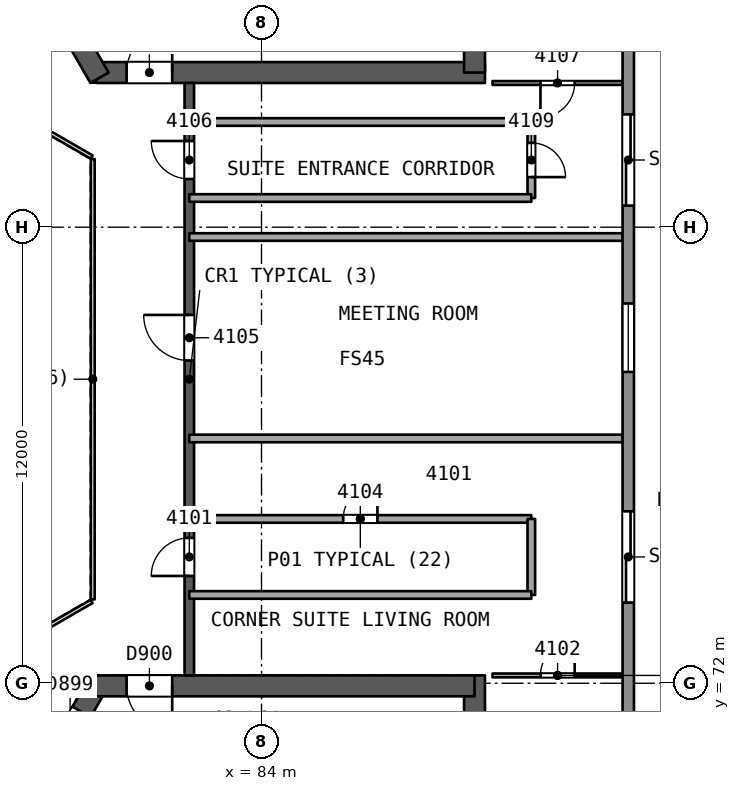
"""IFC4 building model, lengths in metres.
Left out: names, types, materials, properties, quantities, classifications, styles, units other than length and angle.
Written with IfcOpenShell. Run it as: python <this file> out.ifc"""

import sys

from ifc_helpers import new_model, si_unit, direction, frame, frame_2d, origin, place, context, subcontext, project, spatial, rectangle, extrude, element, fill, save


model = new_model("IFC4")
c1 = context("Model", 3, precision=1e-05, world=origin(), true_north=direction((0.0, 1.0)))
c2 = subcontext(c1, "Body", "Model", "MODEL_VIEW")
j1 = project(units=[si_unit("LENGTHUNIT", "METRE"), si_unit("PLANEANGLEUNIT", "RADIAN")], contexts=[c1])
p1 = place(None, origin())
s1 = spatial("IfcSite", under=j1, at=p1, CompositionType="ELEMENT")
p2 = place(p1, origin())
s2 = spatial("IfcBuilding", under=s1, at=p2, CompositionType="ELEMENT")
p3 = place(p2, frame((0.0, 0.0, 171.1)))
s3 = spatial("IfcBuildingStorey", under=s2, at=p3, CompositionType="ELEMENT", Elevation=171.1)
p4 = place(p3, frame((79.659, 88.069, 0.0), z_axis=(0.0, 0.0, 1.0), x_axis=(1.0, 0.0, 0.0)))
e1 = element("IfcWall", 1, at=p4, inside=s3, PredefinedType="SHEAR", context=c2, shape_type="SweptSolid", body=[
    extrude(rectangle(XDim=10.221, YDim=0.55, at=frame_2d((5.111, 0.0))), origin(), (0.0, 0.0, 1.0), 3.7),
])
p5 = place(p4, frame((0.791, 0.0, 0.0)))
e2 = element("IfcOpeningElement", 2, at=p5, cuts=e1, PredefinedType="OPENING", context=c2, shape_type="SweptSolid", body=[
    extrude(rectangle(XDim=1.2, YDim=2.1, at=frame_2d((0.6, 1.05))), frame((0.0, 0.286, 0.0), z_axis=(0.0, -1.0, 0.0), x_axis=(1.0, 0.0, 0.0)), (0.0, 0.0, 1.0), 0.571),
])
p6 = place(p3, frame((89.605, 88.069, 0.0), z_axis=(0.0, 0.0, 1.0), x_axis=(0.0, 1.0, 0.0)))
e3 = element("IfcWall", 3, at=p6, inside=s3, PredefinedType="SHEAR", context=c2, shape_type="SweptSolid", body=[
    extrude(rectangle(XDim=14.058, YDim=0.55, at=frame_2d((7.029, 0.0))), origin(), (0.0, 0.0, 1.0), 3.7),
])
p7 = place(p3, frame((74.686, 96.683, 0.0), z_axis=(0.0, 0.0, 1.0), x_axis=(0.499997818338, -0.866026663364, 0.0)))
e4 = element("IfcWall", 4, at=p7, inside=s3, PredefinedType="SHEAR", context=c2, shape_type="SweptSolid", body=[
    extrude(rectangle(XDim=10.105, YDim=0.55, at=frame_2d((5.052, 0.0))), origin(), (0.0, 0.0, 1.0), 3.7),
])
p8 = place(p7, frame((7.955, 0.0, 0.0)))
e5 = element("IfcOpeningElement", 5, at=p8, cuts=e4, PredefinedType="OPENING", context=c2, shape_type="SweptSolid", body=[
    extrude(rectangle(XDim=1.2, YDim=2.1, at=frame_2d((0.6, 1.05))), frame((0.0, 0.286, 0.0), z_axis=(0.0, -1.0, 0.0), x_axis=(1.0, 0.0, 0.0)), (0.0, 0.0, 1.0), 0.571),
])
p9 = place(p3, frame((79.659, 71.931, 0.0), z_axis=(0.0, 0.0, 1.0), x_axis=(-0.500000202252, -0.866025287014, 0.0)))
e6 = element("IfcWall", 6, at=p9, inside=s3, PredefinedType="SHEAR", context=c2, shape_type="SweptSolid", body=[
    extrude(rectangle(XDim=10.221, YDim=0.55, at=frame_2d((5.111, 0.0))), origin(), (0.0, 0.0, 1.0), 3.7),
])
p10 = place(p9, frame((0.791, 0.0, 0.0)))
e7 = element("IfcOpeningElement", 7, at=p10, cuts=e6, PredefinedType="OPENING", context=c2, shape_type="SweptSolid", body=[
    extrude(rectangle(XDim=1.2, YDim=2.1, at=frame_2d((0.6, 1.05))), frame((0.0, 0.286, 0.0), z_axis=(0.0, -1.0, 0.0), x_axis=(1.0, 0.0, 0.0)), (0.0, 0.0, 1.0), 0.571),
])
p11 = place(p3, frame((89.605, 58.031, 0.0), z_axis=(0.0, 0.0, 1.0), x_axis=(0.0, 1.0, 0.0)))
e8 = element("IfcWall", 8, at=p11, inside=s3, PredefinedType="SHEAR", context=c2, shape_type="SweptSolid", body=[
    extrude(rectangle(XDim=14.175, YDim=0.55, at=frame_2d((7.087, 0.0))), origin(), (0.0, 0.0, 1.0), 3.7),
])
p12 = place(p3, frame((89.605, 71.931, 0.0), z_axis=(0.0, 0.0, 1.0), x_axis=(-1.0, 0.0, 0.0)))
e9 = element("IfcWall", 9, at=p12, inside=s3, PredefinedType="SHEAR", context=c2, shape_type="SweptSolid", body=[
    extrude(rectangle(XDim=10.105, YDim=0.55, at=frame_2d((5.052, 0.0))), origin(), (0.0, 0.0, 1.0), 3.7),
])
p13 = place(p12, frame((7.955, 0.0, 0.0)))
e10 = element("IfcOpeningElement", 10, at=p13, cuts=e9, PredefinedType="OPENING", context=c2, shape_type="SweptSolid", body=[
    extrude(rectangle(XDim=1.2, YDim=2.1, at=frame_2d((0.6, 1.05))), frame((0.0, 0.286, 0.0), z_axis=(0.0, -1.0, 0.0), x_axis=(1.0, 0.0, 0.0)), (0.0, 0.0, 1.0), 0.571),
])
p14 = place(p3, frame((82.1, 72.206, 0.0), z_axis=(0.0, 0.0, 1.0), x_axis=(0.0, 1.0, 0.0)))
e11 = element("IfcWall", 11, at=p14, inside=s3, PredefinedType="SHEAR", context=c2, shape_type="SweptSolid", body=[
    extrude(rectangle(XDim=15.588, YDim=0.25, at=frame_2d((7.794, 0.0))), origin(), (0.0, 0.0, 1.0), 3.25),
])
p15 = place(p14, frame((2.618, 0.0, 0.0)))
e12 = element("IfcOpeningElement", 12, at=p15, cuts=e11, PredefinedType="OPENING", context=c2, shape_type="SweptSolid", body=[
    extrude(rectangle(XDim=1.0, YDim=2.1, at=frame_2d((0.5, 1.05))), frame((0.0, 0.135, 0.0), z_axis=(0.0, -1.0, 0.0), x_axis=(1.0, 0.0, 0.0)), (0.0, 0.0, 1.0), 0.271),
])
p16 = place(p14, frame((8.285, 0.0, 0.0)))
e13 = element("IfcOpeningElement", 13, at=p16, cuts=e11, PredefinedType="OPENING", context=c2, shape_type="SweptSolid", body=[
    extrude(rectangle(XDim=1.2, YDim=2.4, at=frame_2d((0.6, 1.2))), frame((0.0, 0.135, 0.0), z_axis=(0.0, -1.0, 0.0), x_axis=(1.0, 0.0, 0.0)), (0.0, 0.0, 1.0), 0.271),
])
p17 = place(p14, frame((13.062, 0.0, 0.0)))
e14 = element("IfcOpeningElement", 14, at=p17, cuts=e11, PredefinedType="OPENING", context=c2, shape_type="SweptSolid", body=[
    extrude(rectangle(XDim=1.0, YDim=2.1, at=frame_2d((0.5, 1.05))), frame((0.0, 0.135, 0.0), z_axis=(0.0, -1.0, 0.0), x_axis=(1.0, 0.0, 0.0)), (0.0, 0.0, 1.0), 0.271),
])
p18 = place(p3, frame((90.079, 72.206, 0.0), z_axis=(0.0, 0.0, 1.0), x_axis=(1.0, 0.0, 0.0)))
e15 = element("IfcWall", 15, at=p18, inside=s3, PredefinedType="PARTITIONING", context=c2, shape_type="SweptSolid", body=[
    extrude(rectangle(XDim=3.423, YDim=0.1, at=frame_2d((1.712, 0.0))), origin(), (0.0, 0.0, 1.0), 3.25),
])
p19 = place(p18, frame((1.262, 0.0, 0.0)))
e16 = element("IfcOpeningElement", 16, at=p19, cuts=e15, PredefinedType="OPENING", context=c2, shape_type="SweptSolid", body=[
    extrude(rectangle(XDim=0.9, YDim=2.1, at=frame_2d((0.45, 1.05))), frame((0.0, 0.061, 0.0), z_axis=(0.0, -1.0, 0.0), x_axis=(1.0, 0.0, 0.0)), (0.0, 0.0, 1.0), 0.121),
])
p20 = place(p3, frame((82.1, 76.323, 0.0), z_axis=(0.0, 0.0, 1.0), x_axis=(1.0, 0.0, 0.0)))
e17 = element("IfcWall", 17, at=p20, inside=s3, PredefinedType="PARTITIONING", context=c2, shape_type="SweptSolid", body=[
    extrude(rectangle(XDim=9.0, YDim=0.2, at=frame_2d((4.5, 0.0))), origin(), (0.0, 0.0, 1.0), 3.25),
])
p21 = place(p20, frame((4.05, 0.0, 0.0)))
e18 = element("IfcOpeningElement", 18, at=p21, cuts=e17, PredefinedType="OPENING", context=c2, shape_type="SweptSolid", body=[
    extrude(rectangle(XDim=0.9, YDim=2.1, at=frame_2d((0.45, 1.05))), frame((0.0, 0.11, 0.0), z_axis=(0.0, -1.0, 0.0), x_axis=(1.0, 0.0, 0.0)), (0.0, 0.0, 1.0), 0.221),
])
p22 = place(p3, frame((91.1, 76.323, 0.0), z_axis=(0.0, 0.0, 1.0), x_axis=(0.0, -1.0, 0.0)))
e19 = element("IfcWall", 19, at=p22, inside=s3, PredefinedType="PARTITIONING", context=c2, shape_type="SweptSolid", body=[
    extrude(rectangle(XDim=2.0, YDim=0.2, at=frame_2d((1.0, 0.0))), origin(), (0.0, 0.0, 1.0), 3.25),
])
p23 = place(p3, frame((91.1, 74.323, 0.0), z_axis=(0.0, 0.0, 1.0), x_axis=(-1.0, 0.0, 0.0)))
e20 = element("IfcWall", 20, at=p23, inside=s3, PredefinedType="PARTITIONING", context=c2, shape_type="SweptSolid", body=[
    extrude(rectangle(XDim=9.0, YDim=0.2, at=frame_2d((4.5, 0.0))), origin(), (0.0, 0.0, 1.0), 3.25),
])
for number, where, z_axis, x_axis in (
    (21, (93.502, 78.441, 0.0), (0.0, 0.0, 1.0), (-1.0, 0.0, 0.0)),
    (22, (93.502, 83.741, 0.0), (0.0, 0.0, 1.0), (-1.0, 0.0, 0.0)),
):
    element("IfcWall", number, at=place(p3, frame(where, z_axis=z_axis, x_axis=x_axis)), inside=s3, PredefinedType="PARTITIONING", context=c2, shape_type="SweptSolid", body=[
        extrude(rectangle(XDim=11.402, YDim=0.2, at=frame_2d((5.701, 0.0))), origin(), (0.0, 0.0, 1.0), 3.25),
    ])
p24 = place(p3, frame((93.502, 87.794, 0.0), z_axis=(0.0, 0.0, 1.0), x_axis=(-1.0, 0.0, 0.0)))
e23 = element("IfcWall", 23, at=p24, inside=s3, PredefinedType="PARTITIONING", context=c2, shape_type="SweptSolid", body=[
    extrude(rectangle(XDim=3.423, YDim=0.1, at=frame_2d((1.712, 0.0))), origin(), (0.0, 0.0, 1.0), 3.25),
])
p25 = place(p24, frame((1.262, 0.0, 0.0)))
e24 = element("IfcOpeningElement", 24, at=p25, cuts=e23, PredefinedType="OPENING", context=c2, shape_type="SweptSolid", body=[
    extrude(rectangle(XDim=0.9, YDim=2.1, at=frame_2d((0.45, 1.05))), frame((0.0, 0.061, 0.0), z_axis=(0.0, -1.0, 0.0), x_axis=(1.0, 0.0, 0.0)), (0.0, 0.0, 1.0), 0.121),
])
p26 = place(p3, frame((82.1, 86.768, 0.0), z_axis=(0.0, 0.0, 1.0), x_axis=(1.0, 0.0, 0.0)))
e25 = element("IfcWall", 25, at=p26, inside=s3, PredefinedType="PARTITIONING", context=c2, shape_type="SweptSolid", body=[
    extrude(rectangle(XDim=9.0, YDim=0.2, at=frame_2d((4.5, 0.0))), origin(), (0.0, 0.0, 1.0), 3.25),
])
p27 = place(p3, frame((91.1, 86.768, 0.0), z_axis=(0.0, 0.0, 1.0), x_axis=(0.0, -1.0, 0.0)))
e26 = element("IfcWall", 26, at=p27, inside=s3, PredefinedType="PARTITIONING", context=c2, shape_type="SweptSolid", body=[
    extrude(rectangle(XDim=2.0, YDim=0.2, at=frame_2d((1.0, 0.0))), origin(), (0.0, 0.0, 1.0), 3.25),
])
p28 = place(p27, frame((0.55, 0.0, 0.0)))
e27 = element("IfcOpeningElement", 27, at=p28, cuts=e26, PredefinedType="OPENING", context=c2, shape_type="SweptSolid", body=[
    extrude(rectangle(XDim=0.9, YDim=2.1, at=frame_2d((0.45, 1.05))), frame((0.0, 0.11, 0.0), z_axis=(0.0, -1.0, 0.0), x_axis=(1.0, 0.0, 0.0)), (0.0, 0.0, 1.0), 0.221),
])
p29 = place(p3, frame((91.1, 84.768, 0.0), z_axis=(0.0, 0.0, 1.0), x_axis=(-1.0, 0.0, 0.0)))
e28 = element("IfcWall", 28, at=p29, inside=s3, PredefinedType="PARTITIONING", context=c2, shape_type="SweptSolid", body=[
    extrude(rectangle(XDim=9.0, YDim=0.2, at=frame_2d((4.5, 0.0))), origin(), (0.0, 0.0, 1.0), 3.25),
])
p30 = place(p3, frame((93.651, 106.818, 0.0), z_axis=(0.0, 0.0, 1.0), x_axis=(0.0, -1.0, 0.0)))
e29 = element("IfcWall", 29, at=p30, inside=s3, PredefinedType="SOLIDWALL", context=c2, shape_type="SweptSolid", body=[
    extrude(rectangle(XDim=53.635, YDim=0.3, at=frame_2d((26.818, 0.0))), origin(), (0.0, 0.0, 1.0), 3.25),
])
p31 = place(p30, frame((30.294, 0.0, 0.0)))
e30 = element("IfcOpeningElement", 30, at=p31, cuts=e29, PredefinedType="OPENING", context=c2, shape_type="SweptSolid", body=[
    extrude(rectangle(XDim=2.4, YDim=2.4, at=frame_2d((1.2, 1.2))), frame((0.0, 0.161, 0.0), z_axis=(0.0, -1.0, 0.0), x_axis=(1.0, 0.0, 0.0)), (0.0, 0.0, 1.0), 0.321),
])
p32 = place(p30, frame((41.683, 0.0, 0.0)))
e31 = element("IfcOpeningElement", 31, at=p32, cuts=e29, PredefinedType="OPENING", context=c2, shape_type="SweptSolid", body=[
    extrude(rectangle(XDim=2.4, YDim=2.4, at=frame_2d((1.2, 1.2))), frame((0.0, 0.161, 0.0), z_axis=(0.0, -1.0, 0.0), x_axis=(1.0, 0.0, 0.0)), (0.0, 0.0, 1.0), 0.321),
])
p33 = place(p30, frame((19.85, 0.0, 0.0)))
e32 = element("IfcOpeningElement", 32, at=p33, cuts=e29, PredefinedType="OPENING", context=c2, shape_type="SweptSolid", body=[
    extrude(rectangle(XDim=2.4, YDim=2.4, at=frame_2d((1.2, 1.2))), frame((0.0, 0.161, 0.0), z_axis=(0.0, -1.0, 0.0), x_axis=(1.0, 0.0, 0.0)), (0.0, 0.0, 1.0), 0.321),
])
p34 = place(p30, frame((9.514, 0.0, 0.0)))
e33 = element("IfcOpeningElement", 33, at=p34, cuts=e29, PredefinedType="OPENING", context=c2, shape_type="SweptSolid", body=[
    extrude(rectangle(XDim=2.4, YDim=2.4, at=frame_2d((1.2, 1.2))), frame((0.0, 0.161, 0.0), z_axis=(0.0, -1.0, 0.0), x_axis=(1.0, 0.0, 0.0)), (0.0, 0.0, 1.0), 0.321),
])
p35 = place(p30, frame((24.826, 0.0, 0.9)))
e34 = element("IfcOpeningElement", 34, at=p35, cuts=e29, PredefinedType="OPENING", context=c2, shape_type="SweptSolid", body=[
    extrude(rectangle(XDim=1.8, YDim=1.5, at=frame_2d((0.9, 0.75))), frame((0.0, 0.161, 0.0), z_axis=(0.0, -1.0, 0.0), x_axis=(1.0, 0.0, 0.0)), (0.0, 0.0, 1.0), 0.321),
])
p36 = place(p3, frame((42.45, 82.744, 0.0), z_axis=(0.0, 0.0, 1.0), x_axis=(0.866024128163, 0.500002209434, 0.0)))
e35 = element("IfcWall", 35, at=p36, inside=s3, PredefinedType="SOLIDWALL", context=c2, shape_type="SweptSolid", body=[
    extrude(rectangle(XDim=53.635, YDim=0.3, at=frame_2d((26.817, 0.0))), origin(), (0.0, 0.0, 1.0), 3.25),
])
p37 = place(p36, frame((20.473, 0.0, 0.0)))
e36 = element("IfcOpeningElement", 36, at=p37, cuts=e35, PredefinedType="OPENING", context=c2, shape_type="SweptSolid", body=[
    extrude(rectangle(XDim=2.4, YDim=2.4, at=frame_2d((1.2, 1.2))), frame((0.0, 0.161, 0.0), z_axis=(0.0, -1.0, 0.0), x_axis=(1.0, 0.0, 0.0)), (0.0, 0.0, 1.0), 0.321),
])
p38 = place(p36, frame((9.514, 0.0, 0.0)))
e37 = element("IfcOpeningElement", 37, at=p38, cuts=e35, PredefinedType="OPENING", context=c2, shape_type="SweptSolid", body=[
    extrude(rectangle(XDim=2.4, YDim=2.4, at=frame_2d((1.2, 1.2))), frame((0.0, 0.161, 0.0), z_axis=(0.0, -1.0, 0.0), x_axis=(1.0, 0.0, 0.0)), (0.0, 0.0, 1.0), 0.321),
])
p39 = place(p36, frame((40.628, 0.0, 0.0)))
e38 = element("IfcOpeningElement", 38, at=p39, cuts=e35, PredefinedType="OPENING", context=c2, shape_type="SweptSolid", body=[
    extrude(rectangle(XDim=2.4, YDim=2.4, at=frame_2d((1.2, 1.2))), frame((0.0, 0.161, 0.0), z_axis=(0.0, -1.0, 0.0), x_axis=(1.0, 0.0, 0.0)), (0.0, 0.0, 1.0), 0.321),
])
p40 = place(p36, frame((27.632, 0.0, 0.9)))
e39 = element("IfcOpeningElement", 39, at=p40, cuts=e35, PredefinedType="OPENING", context=c2, shape_type="SweptSolid", body=[
    extrude(rectangle(XDim=1.8, YDim=1.5, at=frame_2d((0.9, 0.75))), frame((0.0, 0.161, 0.0), z_axis=(0.0, -1.0, 0.0), x_axis=(1.0, 0.0, 0.0)), (0.0, 0.0, 1.0), 0.321),
])
p41 = place(p36, frame((24.826, 0.0, 0.9)))
e40 = element("IfcOpeningElement", 40, at=p41, cuts=e35, PredefinedType="OPENING", context=c2, shape_type="SweptSolid", body=[
    extrude(rectangle(XDim=1.8, YDim=1.5, at=frame_2d((0.9, 0.75))), frame((0.0, 0.161, 0.0), z_axis=(0.0, -1.0, 0.0), x_axis=(1.0, 0.0, 0.0)), (0.0, 0.0, 1.0), 0.321),
])
p42 = place(p3, frame((88.899, 50.439, 0.0), z_axis=(0.0, 0.0, 1.0), x_axis=(-0.866024128163, 0.500002209434, 0.0)))
e41 = element("IfcWall", 41, at=p42, inside=s3, PredefinedType="SOLIDWALL", context=c2, shape_type="SweptSolid", body=[
    extrude(rectangle(XDim=53.635, YDim=0.3, at=frame_2d((26.817, 0.0))), origin(), (0.0, 0.0, 1.0), 3.25),
])
p43 = place(p42, frame((30.45, 0.0, 0.0)))
e42 = element("IfcOpeningElement", 42, at=p43, cuts=e41, PredefinedType="OPENING", context=c2, shape_type="SweptSolid", body=[
    extrude(rectangle(XDim=2.4, YDim=2.4, at=frame_2d((1.2, 1.2))), frame((0.0, 0.161, 0.0), z_axis=(0.0, -1.0, 0.0), x_axis=(1.0, 0.0, 0.0)), (0.0, 0.0, 1.0), 0.321),
])
p44 = place(p42, frame((41.683, 0.0, 0.0)))
e43 = element("IfcOpeningElement", 43, at=p44, cuts=e41, PredefinedType="OPENING", context=c2, shape_type="SweptSolid", body=[
    extrude(rectangle(XDim=2.4, YDim=2.4, at=frame_2d((1.2, 1.2))), frame((0.0, 0.161, 0.0), z_axis=(0.0, -1.0, 0.0), x_axis=(1.0, 0.0, 0.0)), (0.0, 0.0, 1.0), 0.321),
])
p45 = place(p42, frame((10.295, 0.0, 0.0)))
e44 = element("IfcOpeningElement", 44, at=p45, cuts=e41, PredefinedType="OPENING", context=c2, shape_type="SweptSolid", body=[
    extrude(rectangle(XDim=2.4, YDim=2.4, at=frame_2d((1.2, 1.2))), frame((0.0, 0.161, 0.0), z_axis=(0.0, -1.0, 0.0), x_axis=(1.0, 0.0, 0.0)), (0.0, 0.0, 1.0), 0.321),
])
p46 = place(p42, frame((24.982, 0.0, 0.9)))
e45 = element("IfcOpeningElement", 45, at=p46, cuts=e41, PredefinedType="OPENING", context=c2, shape_type="SweptSolid", body=[
    extrude(rectangle(XDim=1.8, YDim=1.5, at=frame_2d((0.9, 0.75))), frame((0.0, 0.161, 0.0), z_axis=(0.0, -1.0, 0.0), x_axis=(1.0, 0.0, 0.0)), (0.0, 0.0, 1.0), 0.321),
])
p47 = place(p3, frame((79.56, 74.206, 0.0), z_axis=(0.0, 0.0, 1.0), x_axis=(0.0, 1.0, 0.0)))
e46 = element("IfcWall", 46, at=p47, inside=s3, PredefinedType="PARTITIONING", context=c2, shape_type="SweptSolid", body=[
    extrude(rectangle(XDim=11.588, YDim=0.1, at=frame_2d((5.794, 0.0))), origin(), (0.0, 0.0, 1.0), 3.25),
])
for number, where, z_axis, x_axis in (
    (47, (79.53, 85.846, 0.0), (0.0, 0.0, 1.0), (-0.866, 0.5, 0.0)),
    (48, (77.798, 73.154, 0.0), (0.0, 0.0, 1.0), (0.866, 0.5, 0.0)),
):
    element("IfcWall", number, at=place(p3, frame(where, z_axis=z_axis, x_axis=x_axis)), inside=s3, PredefinedType="PARTITIONING", context=c2, shape_type="SweptSolid", body=[
        extrude(rectangle(XDim=2.0, YDim=0.1, at=frame_2d((1.0, 0.0))), origin(), (0.0, 0.0, 1.0), 3.25),
    ])
p48 = place(p15, origin())
e49 = element("IfcDoor", 49, at=p48, inside=s3, OperationType="SINGLE_SWING_LEFT", PredefinedType="NOTDEFINED", context=c2, shape_type="SweptSolid", body=[
    extrude(rectangle(XDim=1.0, YDim=2.1, at=frame_2d((0.5, 1.05))), frame((0.0, 0.025, 0.0), z_axis=(0.0, -1.0, 0.0), x_axis=(1.0, 0.0, 0.0)), (0.0, 0.0, 1.0), 0.05),
])
fill(e12, e49)
p49 = place(p19, origin())
e50 = element("IfcDoor", 50, at=p49, inside=s3, OperationType="SINGLE_SWING_RIGHT", PredefinedType="NOTDEFINED", context=c2, shape_type="SweptSolid", body=[
    extrude(rectangle(XDim=0.9, YDim=2.1, at=frame_2d((0.45, 1.05))), frame((0.0, 0.025, 0.0), z_axis=(0.0, -1.0, 0.0), x_axis=(1.0, 0.0, 0.0)), (0.0, 0.0, 1.0), 0.05),
])
fill(e16, e50)
p50 = place(p21, origin())
e51 = element("IfcDoor", 51, at=p50, inside=s3, OperationType="SINGLE_SWING_RIGHT", PredefinedType="NOTDEFINED", context=c2, shape_type="SweptSolid", body=[
    extrude(rectangle(XDim=0.9, YDim=2.1, at=frame_2d((0.45, 1.05))), frame((0.0, 0.025, 0.0), z_axis=(0.0, -1.0, 0.0), x_axis=(1.0, 0.0, 0.0)), (0.0, 0.0, 1.0), 0.05),
])
fill(e18, e51)
p51 = place(p16, origin())
e52 = element("IfcDoor", 52, at=p51, inside=s3, OperationType="SINGLE_SWING_RIGHT", PredefinedType="NOTDEFINED", context=c2, shape_type="SweptSolid", body=[
    extrude(rectangle(XDim=1.2, YDim=2.4, at=frame_2d((0.6, 1.2))), frame((0.0, 0.025, 0.0), z_axis=(0.0, -1.0, 0.0), x_axis=(1.0, 0.0, 0.0)), (0.0, 0.0, 1.0), 0.05),
])
fill(e13, e52)
p52 = place(p17, origin())
e53 = element("IfcDoor", 53, at=p52, inside=s3, OperationType="SINGLE_SWING_RIGHT", PredefinedType="NOTDEFINED", context=c2, shape_type="SweptSolid", body=[
    extrude(rectangle(XDim=1.0, YDim=2.1, at=frame_2d((0.5, 1.05))), frame((0.0, 0.025, 0.0), z_axis=(0.0, -1.0, 0.0), x_axis=(1.0, 0.0, 0.0)), (0.0, 0.0, 1.0), 0.05),
])
fill(e14, e53)
p53 = place(p25, origin())
e54 = element("IfcDoor", 54, at=p53, inside=s3, OperationType="SINGLE_SWING_RIGHT", PredefinedType="NOTDEFINED", context=c2, shape_type="SweptSolid", body=[
    extrude(rectangle(XDim=0.9, YDim=2.1, at=frame_2d((0.45, 1.05))), frame((0.0, 0.025, 0.0), z_axis=(0.0, -1.0, 0.0), x_axis=(1.0, 0.0, 0.0)), (0.0, 0.0, 1.0), 0.05),
])
fill(e24, e54)
p54 = place(p28, origin())
e55 = element("IfcDoor", 55, at=p54, inside=s3, OperationType="SINGLE_SWING_RIGHT", PredefinedType="NOTDEFINED", context=c2, shape_type="SweptSolid", body=[
    extrude(rectangle(XDim=0.9, YDim=2.1, at=frame_2d((0.45, 1.05))), frame((0.0, 0.025, 0.0), z_axis=(0.0, -1.0, 0.0), x_axis=(1.0, 0.0, 0.0)), (0.0, 0.0, 1.0), 0.05),
])
fill(e27, e55)
p55 = place(p31, origin())
e56 = element("IfcDoor", 56, at=p55, inside=s3, OperationType="SLIDING_TO_LEFT", PredefinedType="NOTDEFINED", context=c2, shape_type="SweptSolid", body=[
    extrude(rectangle(XDim=2.4, YDim=2.4, at=frame_2d((1.2, 1.2))), frame((0.0, 0.025, 0.0), z_axis=(0.0, -1.0, 0.0), x_axis=(1.0, 0.0, 0.0)), (0.0, 0.0, 1.0), 0.05),
])
fill(e30, e56)
p56 = place(p33, origin())
e57 = element("IfcDoor", 57, at=p56, inside=s3, OperationType="SLIDING_TO_LEFT", PredefinedType="NOTDEFINED", context=c2, shape_type="SweptSolid", body=[
    extrude(rectangle(XDim=2.4, YDim=2.4, at=frame_2d((1.2, 1.2))), frame((0.0, 0.025, 0.0), z_axis=(0.0, -1.0, 0.0), x_axis=(1.0, 0.0, 0.0)), (0.0, 0.0, 1.0), 0.05),
])
fill(e32, e57)
p57 = place(p35, origin())
e58 = element("IfcWindow", 58, at=p57, inside=s3, PartitioningType="SINGLE_PANEL", PredefinedType="WINDOW", context=c2, shape_type="SweptSolid", body=[
    extrude(rectangle(XDim=1.8, YDim=1.5, at=frame_2d((0.9, 0.75))), frame((0.0, 0.03, 0.0), z_axis=(0.0, -1.0, 0.0), x_axis=(1.0, 0.0, 0.0)), (0.0, 0.0, 1.0), 0.06),
])
fill(e34, e58)
p58 = place(p5, origin())
e59 = element("IfcDoor", 59, at=p58, inside=s3, OperationType="SINGLE_SWING_RIGHT", PredefinedType="NOTDEFINED", context=c2, shape_type="SweptSolid", body=[
    extrude(rectangle(XDim=1.2, YDim=2.1, at=frame_2d((0.6, 1.05))), frame((0.0, 0.025, 0.0), z_axis=(0.0, -1.0, 0.0), x_axis=(1.0, 0.0, 0.0)), (0.0, 0.0, 1.0), 0.05),
])
fill(e2, e59)
p59 = place(p10, origin())
e60 = element("IfcDoor", 60, at=p59, inside=s3, OperationType="SINGLE_SWING_RIGHT", PredefinedType="NOTDEFINED", context=c2, shape_type="SweptSolid", body=[
    extrude(rectangle(XDim=1.2, YDim=2.1, at=frame_2d((0.6, 1.05))), frame((0.0, 0.025, 0.0), z_axis=(0.0, -1.0, 0.0), x_axis=(1.0, 0.0, 0.0)), (0.0, 0.0, 1.0), 0.05),
])
fill(e7, e60)
p60 = place(p13, origin())
e61 = element("IfcDoor", 61, at=p60, inside=s3, OperationType="SINGLE_SWING_LEFT", PredefinedType="NOTDEFINED", context=c2, shape_type="SweptSolid", body=[
    extrude(rectangle(XDim=1.2, YDim=2.1, at=frame_2d((0.6, 1.05))), frame((0.0, 0.025, 0.0), z_axis=(0.0, -1.0, 0.0), x_axis=(1.0, 0.0, 0.0)), (0.0, 0.0, 1.0), 0.05),
])
fill(e10, e61)
save(model, sys.argv[1])
